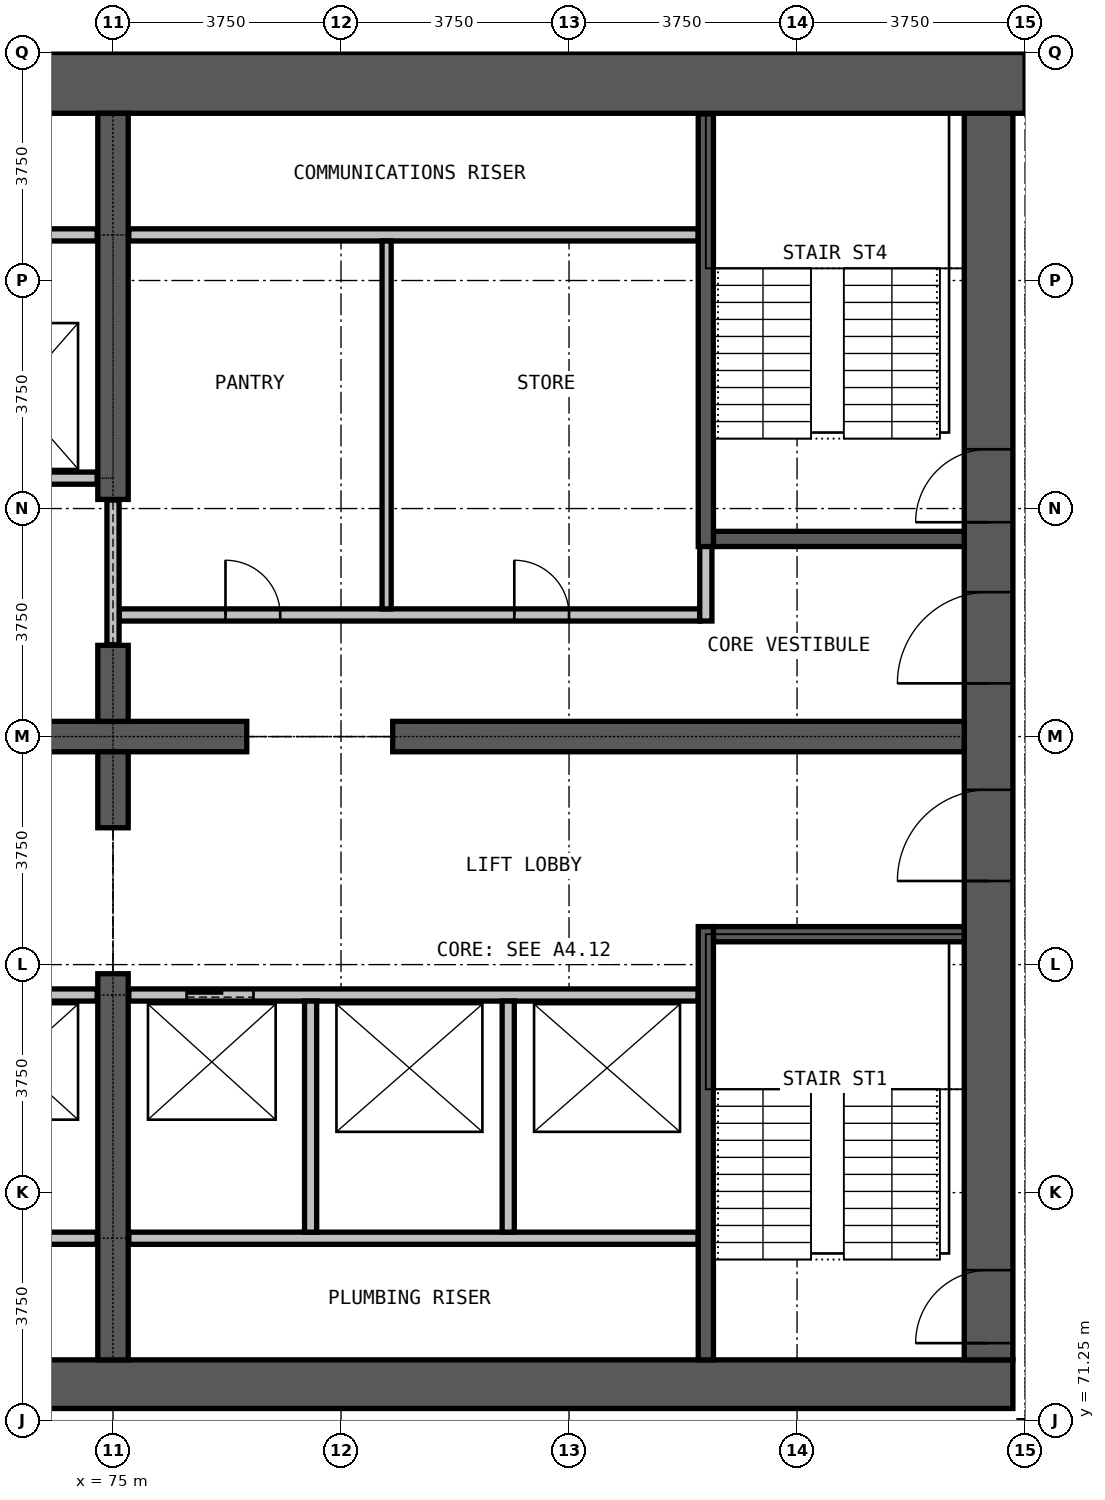
"""IFC4 building model, lengths in metres.
Left out: names, types, materials, properties, quantities, classifications, styles, units other than length and angle.
Written with IfcOpenShell. Run it as: python <this file> out.ifc"""

import sys

from ifc_helpers import new_model, si_unit, direction, frame, frame_2d, origin, place, context, subcontext, project, spatial, rectangle, extrude, element, fill, save


model = new_model("IFC4")
c1 = context("Model", 3, precision=1e-05, world=origin(), true_north=direction((0.0, 1.0)))
c2 = subcontext(c1, "Body", "Model", "MODEL_VIEW")
j1 = project(units=[si_unit("LENGTHUNIT", "METRE"), si_unit("PLANEANGLEUNIT", "RADIAN")], contexts=[c1])
p1 = place(None, origin())
s1 = spatial("IfcSite", under=j1, at=p1, CompositionType="ELEMENT")
p2 = place(p1, origin())
s2 = spatial("IfcBuilding", under=s1, at=p2, CompositionType="ELEMENT")
p3 = place(p2, frame((0.0, 0.0, 121.6)))
s3 = spatial("IfcBuildingStorey", under=s2, at=p3, CompositionType="ELEMENT", Elevation=121.6)
p4 = place(p3, frame((60.2, 71.85, 0.0), z_axis=(0.0, 0.0, 1.0), x_axis=(1.0, 0.0, 0.0)))
e1 = element("IfcWall", 1, at=p4, inside=s3, PredefinedType="SHEAR", context=c2, shape_type="SweptSolid", body=[
    extrude(rectangle(XDim=29.6, YDim=0.8, at=frame_2d((14.8, 0.0))), origin(), (0.0, 0.0, 1.0), 3.6),
])
p5 = place(p3, frame((89.4, 72.25, 0.0), z_axis=(0.0, 0.0, 1.0), x_axis=(0.0, 1.0, 0.0)))
e2 = element("IfcWall", 2, at=p5, inside=s3, PredefinedType="SHEAR", context=c2, shape_type="SweptSolid", body=[
    extrude(rectangle(XDim=20.5, YDim=0.8, at=frame_2d((10.25, 0.0))), origin(), (0.0, 0.0, 1.0), 3.6),
])
p6 = place(p5, frame((0.275, 0.0, 0.0)))
e3 = element("IfcOpeningElement", 3, at=p6, cuts=e2, PredefinedType="OPENING", context=c2, shape_type="SweptSolid", body=[
    extrude(rectangle(XDim=1.2, YDim=2.2, at=frame_2d((0.6, 1.1))), frame((0.0, 0.41, 0.0), z_axis=(0.0, -1.0, 0.0), x_axis=(1.0, 0.0, 0.0)), (0.0, 0.0, 1.0), 0.82),
])
p7 = place(p5, frame((13.775, 0.0, 0.0)))
e4 = element("IfcOpeningElement", 4, at=p7, cuts=e2, PredefinedType="OPENING", context=c2, shape_type="SweptSolid", body=[
    extrude(rectangle(XDim=1.2, YDim=2.2, at=frame_2d((0.6, 1.1))), frame((0.0, 0.41, 0.0), z_axis=(0.0, -1.0, 0.0), x_axis=(1.0, 0.0, 0.0)), (0.0, 0.0, 1.0), 0.82),
])
p8 = place(p5, frame((7.875, 0.0, 0.0)))
e5 = element("IfcOpeningElement", 5, at=p8, cuts=e2, PredefinedType="OPENING", context=c2, shape_type="SweptSolid", body=[
    extrude(rectangle(XDim=1.5, YDim=2.2, at=frame_2d((0.75, 1.1))), frame((0.0, 0.41, 0.0), z_axis=(0.0, -1.0, 0.0), x_axis=(1.0, 0.0, 0.0)), (0.0, 0.0, 1.0), 0.82),
])
p9 = place(p5, frame((11.125, 0.0, 0.0)))
e6 = element("IfcOpeningElement", 6, at=p9, cuts=e2, PredefinedType="OPENING", context=c2, shape_type="SweptSolid", body=[
    extrude(rectangle(XDim=1.5, YDim=2.2, at=frame_2d((0.75, 1.1))), frame((0.0, 0.41, 0.0), z_axis=(0.0, -1.0, 0.0), x_axis=(1.0, 0.0, 0.0)), (0.0, 0.0, 1.0), 0.82),
])
p10 = place(p3, frame((90.0, 93.25, 0.0), z_axis=(0.0, 0.0, 1.0), x_axis=(-1.0, 0.0, 0.0)))
e7 = element("IfcWall", 7, at=p10, inside=s3, PredefinedType="SHEAR", context=c2, shape_type="SweptSolid", body=[
    extrude(rectangle(XDim=30.0, YDim=1.0, at=frame_2d((15.0, 0.0))), origin(), (0.0, 0.0, 1.0), 3.6),
])
p11 = place(p3, frame((72.8, 82.5, 0.0), z_axis=(0.0, 0.0, 1.0), x_axis=(1.0, 0.0, 0.0)))
e8 = element("IfcWall", 8, at=p11, inside=s3, PredefinedType="SHEAR", context=c2, shape_type="SweptSolid", body=[
    extrude(rectangle(XDim=4.4, YDim=0.5, at=frame_2d((2.2, 0.0))), origin(), (0.0, 0.0, 1.0), 3.6),
])
p12 = place(p3, frame((79.6, 82.5, 0.0), z_axis=(0.0, 0.0, 1.0), x_axis=(1.0, 0.0, 0.0)))
e9 = element("IfcWall", 9, at=p12, inside=s3, PredefinedType="SHEAR", context=c2, shape_type="SweptSolid", body=[
    extrude(rectangle(XDim=9.4, YDim=0.5, at=frame_2d((4.7, 0.0))), origin(), (0.0, 0.0, 1.0), 3.6),
])
p13 = place(p3, frame((75.0, 72.25, 0.0), z_axis=(0.0, 0.0, 1.0), x_axis=(0.0, 1.0, 0.0)))
e10 = element("IfcWall", 10, at=p13, inside=s3, PredefinedType="SHEAR", context=c2, shape_type="SweptSolid", body=[
    extrude(rectangle(XDim=6.35, YDim=0.5, at=frame_2d((3.175, 0.0))), origin(), (0.0, 0.0, 1.0), 3.6),
])
for number, where, z_axis, x_axis in (
    (11, (75.0, 81.0, 0.0), (0.0, 0.0, 1.0), (0.0, 1.0, 0.0)),
    (12, (75.0, 82.75, 0.0), (0.0, 0.0, 1.0), (0.0, 1.0, 0.0)),
):
    element("IfcWall", number, at=place(p3, frame(where, z_axis=z_axis, x_axis=x_axis)), inside=s3, PredefinedType="SHEAR", context=c2, shape_type="SweptSolid", body=[
        extrude(rectangle(XDim=1.25, YDim=0.5, at=frame_2d((0.625, 0.0))), origin(), (0.0, 0.0, 1.0), 3.6),
    ])
p14 = place(p3, frame((75.0, 86.4, 0.0), z_axis=(0.0, 0.0, 1.0), x_axis=(0.0, 1.0, 0.0)))
e13 = element("IfcWall", 13, at=p14, inside=s3, PredefinedType="SHEAR", context=c2, shape_type="SweptSolid", body=[
    extrude(rectangle(XDim=6.35, YDim=0.5, at=frame_2d((3.175, 0.0))), origin(), (0.0, 0.0, 1.0), 3.6),
])
p15 = place(p3, frame((75.1, 84.5, 0.0), z_axis=(0.0, 0.0, 1.0), x_axis=(1.0, 0.0, 0.0)))
e14 = element("IfcWall", 14, at=p15, inside=s3, PredefinedType="PARTITIONING", context=c2, shape_type="SweptSolid", body=[
    extrude(rectangle(XDim=9.55, YDim=0.2, at=frame_2d((4.775, 0.0))), origin(), (0.0, 0.0, 1.0), 3.3),
])
p16 = place(p15, frame((1.75, 0.0, 0.0)))
e15 = element("IfcOpeningElement", 15, at=p16, cuts=e14, PredefinedType="OPENING", context=c2, shape_type="SweptSolid", body=[
    extrude(rectangle(XDim=0.9, YDim=2.2, at=frame_2d((0.45, 1.1))), frame((0.0, 0.11, 0.0), z_axis=(0.0, -1.0, 0.0), x_axis=(1.0, 0.0, 0.0)), (0.0, 0.0, 1.0), 0.22),
])
p17 = place(p15, frame((6.5, 0.0, 0.0)))
e16 = element("IfcOpeningElement", 16, at=p17, cuts=e14, PredefinedType="OPENING", context=c2, shape_type="SweptSolid", body=[
    extrude(rectangle(XDim=0.9, YDim=2.2, at=frame_2d((0.45, 1.1))), frame((0.0, 0.11, 0.0), z_axis=(0.0, -1.0, 0.0), x_axis=(1.0, 0.0, 0.0)), (0.0, 0.0, 1.0), 0.22),
])
p18 = place(p3, frame((75.26, 90.75, 0.0), z_axis=(0.0, 0.0, 1.0), x_axis=(1.0, 0.0, 0.0)))
e17 = element("IfcWall", 17, at=p18, inside=s3, PredefinedType="PARTITIONING", context=c2, shape_type="SweptSolid", body=[
    extrude(rectangle(XDim=9.365, YDim=0.2, at=frame_2d((4.683, 0.0))), origin(), (0.0, 0.0, 1.0), 3.3),
])
p19 = place(p3, frame((75.0, 84.01, 0.0), z_axis=(0.0, 0.0, 1.0), x_axis=(0.0, 1.0, 0.0)))
e18 = element("IfcWall", 18, at=p19, inside=s3, PredefinedType="PARTITIONING", context=c2, shape_type="SweptSolid", body=[
    extrude(rectangle(XDim=2.38, YDim=0.2, at=frame_2d((1.19, 0.0))), origin(), (0.0, 0.0, 1.0), 2.4),
])
p20 = place(p3, frame((84.75, 84.4, 0.0), z_axis=(0.0, 0.0, 1.0), x_axis=(0.0, 1.0, 0.0)))
e19 = element("IfcWall", 19, at=p20, inside=s3, PredefinedType="PARTITIONING", context=c2, shape_type="SweptSolid", body=[
    extrude(rectangle(XDim=1.475, YDim=0.2, at=frame_2d((0.738, 0.0))), origin(), (0.0, 0.0, 1.0), 3.3),
])
p21 = place(p3, frame((79.5, 84.6, 0.0), z_axis=(0.0, 0.0, 1.0), x_axis=(0.0, 1.0, 0.0)))
e20 = element("IfcWall", 20, at=p21, inside=s3, PredefinedType="PARTITIONING", context=c2, shape_type="SweptSolid", body=[
    extrude(rectangle(XDim=6.05, YDim=0.15, at=frame_2d((3.025, 0.0))), origin(), (0.0, 0.0, 1.0), 3.3),
])
for number, where, z_axis, x_axis in (
    (21, (65.375, 74.25, 0.0), (0.0, 0.0, 1.0), (1.0, 0.0, 0.0)),
    (22, (75.26, 74.25, 0.0), (0.0, 0.0, 1.0), (1.0, 0.0, 0.0)),
):
    element("IfcWall", number, at=place(p3, frame(where, z_axis=z_axis, x_axis=x_axis)), inside=s3, PredefinedType="PARTITIONING", context=c2, shape_type="SweptSolid", body=[
        extrude(rectangle(XDim=9.365, YDim=0.2, at=frame_2d((4.683, 0.0))), origin(), (0.0, 0.0, 1.0), 3.3),
    ])
p22 = place(p3, frame((65.375, 78.25, 0.0), z_axis=(0.0, 0.0, 1.0), x_axis=(1.0, 0.0, 0.0)))
e23 = element("IfcWall", 23, at=p22, inside=s3, PredefinedType="PARTITIONING", context=c2, shape_type="SweptSolid", body=[
    extrude(rectangle(XDim=9.365, YDim=0.2, at=frame_2d((4.683, 0.0))), origin(), (0.0, 0.0, 1.0), 3.3),
])
p23 = place(p22, frame((1.0, 0.0, 0.0)))
e24 = element("IfcOpeningElement", 24, at=p23, cuts=e23, PredefinedType="OPENING", context=c2, shape_type="SweptSolid", body=[
    extrude(rectangle(XDim=1.1, YDim=2.2, at=frame_2d((0.55, 1.1))), frame((0.0, 0.11, 0.0), z_axis=(0.0, -1.0, 0.0), x_axis=(1.0, 0.0, 0.0)), (0.0, 0.0, 1.0), 0.22),
])
p24 = place(p22, frame((4.175, 0.0, 0.0)))
e25 = element("IfcOpeningElement", 25, at=p24, cuts=e23, PredefinedType="OPENING", context=c2, shape_type="SweptSolid", body=[
    extrude(rectangle(XDim=1.1, YDim=2.2, at=frame_2d((0.55, 1.1))), frame((0.0, 0.11, 0.0), z_axis=(0.0, -1.0, 0.0), x_axis=(1.0, 0.0, 0.0)), (0.0, 0.0, 1.0), 0.22),
])
p25 = place(p22, frame((7.325, 0.0, 0.0)))
e26 = element("IfcOpeningElement", 26, at=p25, cuts=e23, PredefinedType="OPENING", context=c2, shape_type="SweptSolid", body=[
    extrude(rectangle(XDim=1.1, YDim=2.2, at=frame_2d((0.55, 1.1))), frame((0.0, 0.11, 0.0), z_axis=(0.0, -1.0, 0.0), x_axis=(1.0, 0.0, 0.0)), (0.0, 0.0, 1.0), 0.22),
])
p26 = place(p3, frame((75.26, 78.25, 0.0), z_axis=(0.0, 0.0, 1.0), x_axis=(1.0, 0.0, 0.0)))
e27 = element("IfcWall", 27, at=p26, inside=s3, PredefinedType="PARTITIONING", context=c2, shape_type="SweptSolid", body=[
    extrude(rectangle(XDim=9.365, YDim=0.2, at=frame_2d((4.683, 0.0))), origin(), (0.0, 0.0, 1.0), 3.3),
])
p27 = place(p26, frame((0.95, 0.0, 0.0)))
e28 = element("IfcOpeningElement", 28, at=p27, cuts=e27, PredefinedType="OPENING", context=c2, shape_type="SweptSolid", body=[
    extrude(rectangle(XDim=1.1, YDim=2.2, at=frame_2d((0.55, 1.1))), frame((0.0, 0.11, 0.0), z_axis=(0.0, -1.0, 0.0), x_axis=(1.0, 0.0, 0.0)), (0.0, 0.0, 1.0), 0.22),
])
p28 = place(p3, frame((65.375, 86.75, 0.0), z_axis=(0.0, 0.0, 1.0), x_axis=(1.0, 0.0, 0.0)))
e29 = element("IfcWall", 29, at=p28, inside=s3, PredefinedType="PARTITIONING", context=c2, shape_type="SweptSolid", body=[
    extrude(rectangle(XDim=9.365, YDim=0.2, at=frame_2d((4.683, 0.0))), origin(), (0.0, 0.0, 1.0), 3.3),
])
p29 = place(p28, frame((1.0, 0.0, 0.0)))
e30 = element("IfcOpeningElement", 30, at=p29, cuts=e29, PredefinedType="OPENING", context=c2, shape_type="SweptSolid", body=[
    extrude(rectangle(XDim=1.1, YDim=2.2, at=frame_2d((0.55, 1.1))), frame((0.0, 0.11, 0.0), z_axis=(0.0, -1.0, 0.0), x_axis=(1.0, 0.0, 0.0)), (0.0, 0.0, 1.0), 0.22),
])
p30 = place(p28, frame((4.175, 0.0, 0.0)))
e31 = element("IfcOpeningElement", 31, at=p30, cuts=e29, PredefinedType="OPENING", context=c2, shape_type="SweptSolid", body=[
    extrude(rectangle(XDim=1.1, YDim=2.2, at=frame_2d((0.55, 1.1))), frame((0.0, 0.11, 0.0), z_axis=(0.0, -1.0, 0.0), x_axis=(1.0, 0.0, 0.0)), (0.0, 0.0, 1.0), 0.22),
])
p31 = place(p28, frame((7.325, 0.0, 0.0)))
e32 = element("IfcOpeningElement", 32, at=p31, cuts=e29, PredefinedType="OPENING", context=c2, shape_type="SweptSolid", body=[
    extrude(rectangle(XDim=1.1, YDim=2.2, at=frame_2d((0.55, 1.1))), frame((0.0, 0.11, 0.0), z_axis=(0.0, -1.0, 0.0), x_axis=(1.0, 0.0, 0.0)), (0.0, 0.0, 1.0), 0.22),
])
p32 = place(p3, frame((65.375, 90.75, 0.0), z_axis=(0.0, 0.0, 1.0), x_axis=(1.0, 0.0, 0.0)))
e33 = element("IfcWall", 33, at=p32, inside=s3, PredefinedType="PARTITIONING", context=c2, shape_type="SweptSolid", body=[
    extrude(rectangle(XDim=9.365, YDim=0.2, at=frame_2d((4.683, 0.0))), origin(), (0.0, 0.0, 1.0), 3.3),
])
for number, where, z_axis, x_axis in (
    (34, (78.25, 74.35, 0.0), (0.0, 0.0, 1.0), (0.0, 1.0, 0.0)),
    (35, (81.5, 74.35, 0.0), (0.0, 0.0, 1.0), (0.0, 1.0, 0.0)),
):
    element("IfcWall", number, at=place(p3, frame(where, z_axis=z_axis, x_axis=x_axis)), inside=s3, PredefinedType="PARTITIONING", context=c2, shape_type="SweptSolid", body=[
        extrude(rectangle(XDim=3.8, YDim=0.2, at=frame_2d((1.9, 0.0))), origin(), (0.0, 0.0, 1.0), 3.3),
    ])
for number, where, z_axis, x_axis in (
    (36, (84.875, 79.25, 0.0), (0.0, 0.0, 1.0), (1.0, 0.0, 0.0)),
    (37, (84.875, 85.75, 0.0), (0.0, 0.0, 1.0), (1.0, 0.0, 0.0)),
):
    element("IfcWall", number, at=place(p3, frame(where, z_axis=z_axis, x_axis=x_axis)), inside=s3, PredefinedType="PARTITIONING", context=c2, shape_type="SweptSolid", body=[
        extrude(rectangle(XDim=4.125, YDim=0.25, at=frame_2d((2.062, 0.0))), origin(), (0.0, 0.0, 1.0), 3.3),
    ])
p33 = place(p3, frame((84.75, 72.25, 0.0), z_axis=(0.0, 0.0, 1.0), x_axis=(0.0, 1.0, 0.0)))
e38 = element("IfcWall", 38, at=p33, inside=s3, PredefinedType="PARTITIONING", context=c2, shape_type="SweptSolid", body=[
    extrude(rectangle(XDim=7.125, YDim=0.25, at=frame_2d((3.562, 0.0))), origin(), (0.0, 0.0, 1.0), 3.3),
])
p34 = place(p3, frame((84.75, 85.625, 0.0), z_axis=(0.0, 0.0, 1.0), x_axis=(0.0, 1.0, 0.0)))
e39 = element("IfcWall", 39, at=p34, inside=s3, PredefinedType="PARTITIONING", context=c2, shape_type="SweptSolid", body=[
    extrude(rectangle(XDim=7.115, YDim=0.25, at=frame_2d((3.558, 0.0))), origin(), (0.0, 0.0, 1.0), 3.3),
])
p35 = place(p27, origin())
e40 = element("IfcDoor", 40, at=p35, inside=s3, OperationType="DOUBLE_DOOR_SLIDING", PredefinedType="DOOR", context=c2, shape_type="SweptSolid", body=[
    extrude(rectangle(XDim=1.1, YDim=2.2, at=frame_2d((0.55, 1.1))), frame((0.0, 0.025, 0.0), z_axis=(0.0, -1.0, 0.0), x_axis=(1.0, 0.0, 0.0)), (0.0, 0.0, 1.0), 0.05),
])
fill(e28, e40)
p36 = place(p6, origin())
e41 = element("IfcDoor", 41, at=p36, inside=s3, OperationType="SINGLE_SWING_LEFT", PredefinedType="DOOR", context=c2, shape_type="SweptSolid", body=[
    extrude(rectangle(XDim=1.2, YDim=2.2, at=frame_2d((0.6, 1.1))), frame((0.0, 0.025, 0.0), z_axis=(0.0, -1.0, 0.0), x_axis=(1.0, 0.0, 0.0)), (0.0, 0.0, 1.0), 0.05),
])
fill(e3, e41)
p37 = place(p7, origin())
e42 = element("IfcDoor", 42, at=p37, inside=s3, OperationType="SINGLE_SWING_LEFT", PredefinedType="DOOR", context=c2, shape_type="SweptSolid", body=[
    extrude(rectangle(XDim=1.2, YDim=2.2, at=frame_2d((0.6, 1.1))), frame((0.0, 0.025, 0.0), z_axis=(0.0, -1.0, 0.0), x_axis=(1.0, 0.0, 0.0)), (0.0, 0.0, 1.0), 0.05),
])
fill(e4, e42)
p38 = place(p8, origin())
e43 = element("IfcDoor", 43, at=p38, inside=s3, OperationType="DOUBLE_DOOR_SINGLE_SWING", PredefinedType="DOOR", context=c2, shape_type="SweptSolid", body=[
    extrude(rectangle(XDim=1.5, YDim=2.2, at=frame_2d((0.75, 1.1))), frame((0.0, 0.025, 0.0), z_axis=(0.0, -1.0, 0.0), x_axis=(1.0, 0.0, 0.0)), (0.0, 0.0, 1.0), 0.05),
])
fill(e5, e43)
p39 = place(p9, origin())
e44 = element("IfcDoor", 44, at=p39, inside=s3, OperationType="DOUBLE_DOOR_SINGLE_SWING", PredefinedType="DOOR", context=c2, shape_type="SweptSolid", body=[
    extrude(rectangle(XDim=1.5, YDim=2.2, at=frame_2d((0.75, 1.1))), frame((0.0, 0.025, 0.0), z_axis=(0.0, -1.0, 0.0), x_axis=(1.0, 0.0, 0.0)), (0.0, 0.0, 1.0), 0.05),
])
fill(e6, e44)
p40 = place(p16, origin())
e45 = element("IfcDoor", 45, at=p40, inside=s3, OperationType="SINGLE_SWING_RIGHT", PredefinedType="DOOR", context=c2, shape_type="SweptSolid", body=[
    extrude(rectangle(XDim=0.9, YDim=2.2, at=frame_2d((0.45, 1.1))), frame((0.0, 0.025, 0.0), z_axis=(0.0, -1.0, 0.0), x_axis=(1.0, 0.0, 0.0)), (0.0, 0.0, 1.0), 0.05),
])
fill(e15, e45)
p41 = place(p17, origin())
e46 = element("IfcDoor", 46, at=p41, inside=s3, OperationType="SINGLE_SWING_RIGHT", PredefinedType="DOOR", context=c2, shape_type="SweptSolid", body=[
    extrude(rectangle(XDim=0.9, YDim=2.2, at=frame_2d((0.45, 1.1))), frame((0.0, 0.025, 0.0), z_axis=(0.0, -1.0, 0.0), x_axis=(1.0, 0.0, 0.0)), (0.0, 0.0, 1.0), 0.05),
])
fill(e16, e46)
save(model, sys.argv[1])
